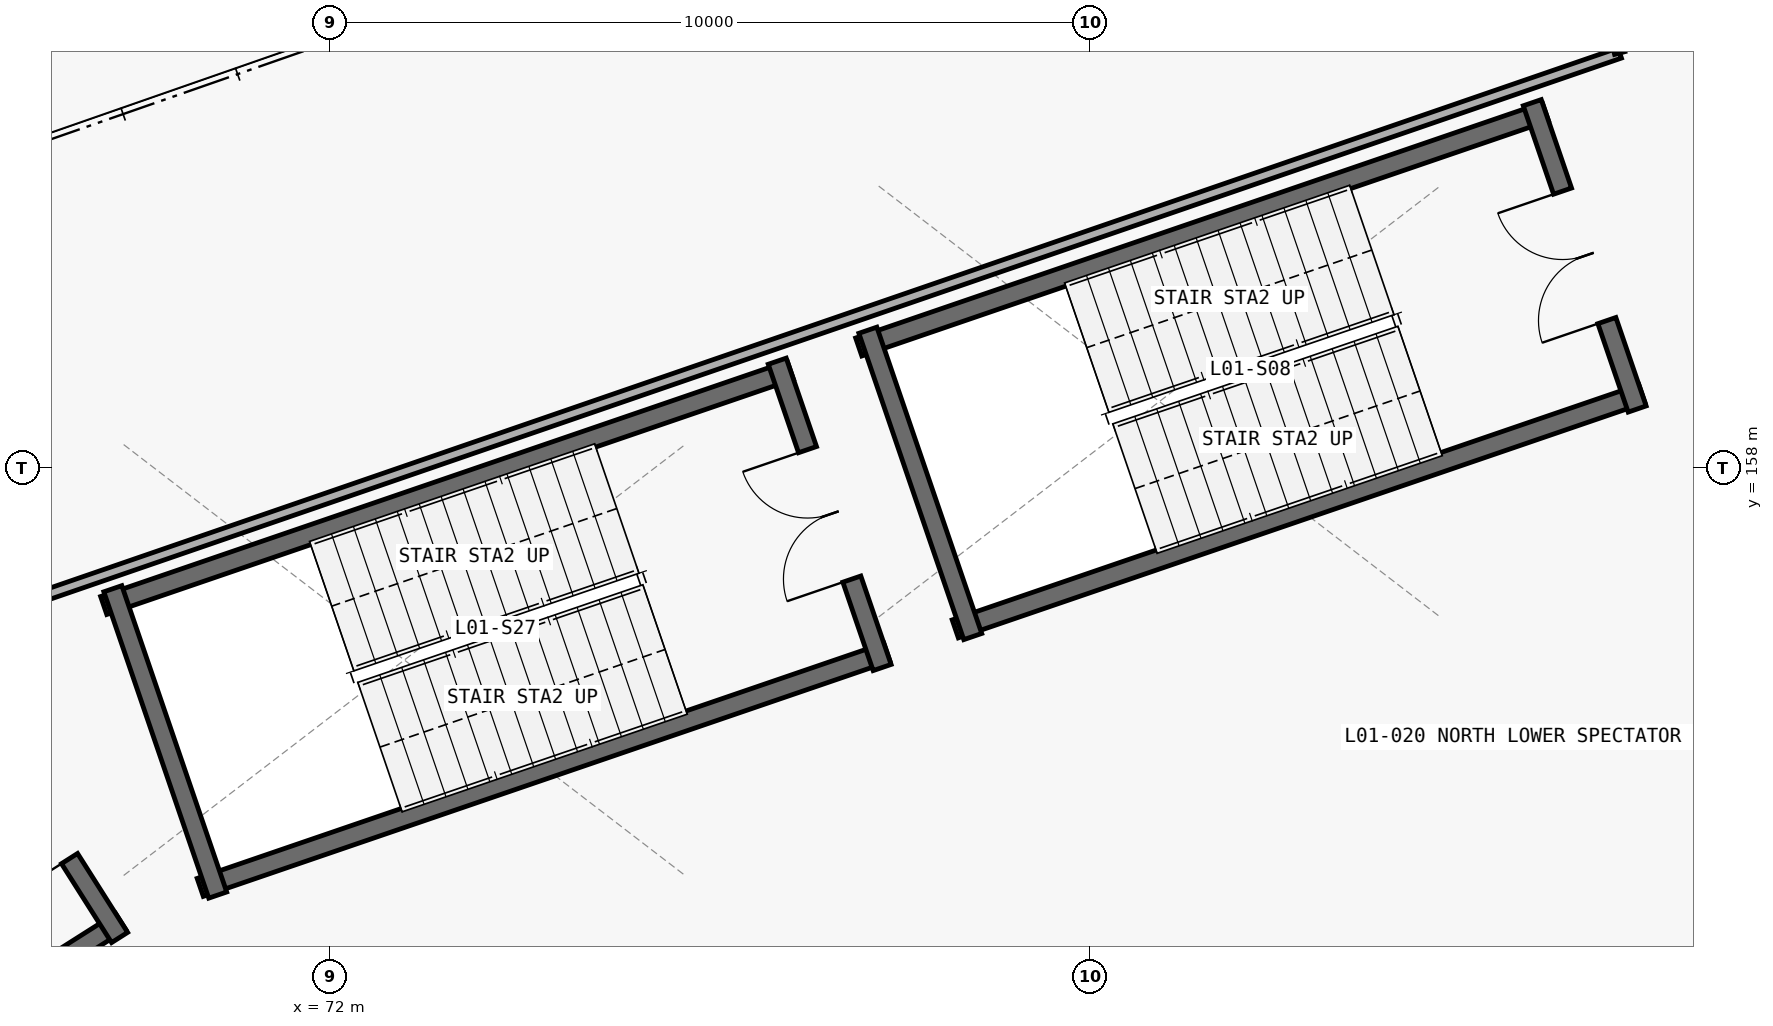
"""IFC4 building model, lengths in metres.
Left out: names, types, materials, properties, quantities, classifications, styles, units other than length and angle.
Written with IfcOpenShell. Run it as: python <this file> out.ifc"""

import sys

from ifc_helpers import new_model, si_unit, direction, frame, frame_2d, origin, place, context, subcontext, project, spatial, rectangle, extrude, element, fill, save


model = new_model("IFC4")
c1 = context("Model", 3, precision=1e-05, world=origin(), true_north=direction((0.0, 1.0)))
c2 = subcontext(c1, "Body", "Model", "MODEL_VIEW")
j1 = project(units=[si_unit("LENGTHUNIT", "METRE"), si_unit("PLANEANGLEUNIT", "RADIAN")], contexts=[c1])
p1 = place(None, origin())
s1 = spatial("IfcSite", under=j1, at=p1, CompositionType="ELEMENT")
p2 = place(p1, origin())
s2 = spatial("IfcBuilding", under=s1, at=p2, CompositionType="ELEMENT")
p3 = place(p2, frame((0.0, 0.0, 5.4)))
s3 = spatial("IfcBuildingStorey", under=s2, at=p3, CompositionType="ELEMENT", Elevation=5.4)
p4 = place(p3, frame((87.993, 162.686, 0.0), z_axis=(0.0, 0.0, 1.0), x_axis=(-0.946064424228, -0.323978556712, 0.0)))
e1 = element("IfcWall", 1, at=p4, inside=s3, PredefinedType="SHEAR", context=c2, shape_type="SweptSolid", body=[
    extrude(rectangle(XDim=9.55, YDim=0.25, at=frame_2d((4.775, 0.0))), origin(), (0.0, 0.0, 1.0), 4.52),
])
p5 = place(p3, frame((80.228, 155.883, 0.0), z_axis=(0.0, 0.0, 1.0), x_axis=(0.946067107432, 0.323970721263, 0.0)))
e2 = element("IfcWall", 2, at=p5, inside=s3, PredefinedType="SHEAR", context=c2, shape_type="SweptSolid", body=[
    extrude(rectangle(XDim=9.55, YDim=0.25, at=frame_2d((4.775, 0.0))), origin(), (0.0, 0.0, 1.0), 4.52),
])
p6 = place(p3, frame((89.199, 158.776, 0.0), z_axis=(0.0, 0.0, 1.0), x_axis=(-0.323988758717, 0.946060930504, 0.0)))
e3 = element("IfcWall", 3, at=p6, inside=s3, PredefinedType="SHEAR", context=c2, shape_type="SweptSolid", body=[
    extrude(rectangle(XDim=4.26, YDim=0.25, at=frame_2d((2.13, 0.0))), origin(), (0.0, 0.0, 1.0), 4.52),
])
p7 = place(p6, frame((1.23, 0.0, 0.0)))
e4 = element("IfcOpeningElement", 4, at=p7, cuts=e3, PredefinedType="OPENING", context=c2, shape_type="SweptSolid", body=[
    extrude(rectangle(XDim=1.8, YDim=2.25, at=frame_2d((0.9, 1.125))), frame((0.0, 0.135, 0.0), z_axis=(0.0, -1.0, 0.0), x_axis=(1.0, 0.0, 0.0)), (0.0, 0.0, 1.0), 0.27),
])
p8 = place(p3, frame((79.078, 159.812, 0.0), z_axis=(0.0, 0.0, 1.0), x_axis=(0.323971192516, -0.946066946056, 0.0)))
e5 = element("IfcWall", 5, at=p8, inside=s3, PredefinedType="SHEAR", context=c2, shape_type="SweptSolid", body=[
    extrude(rectangle(XDim=4.26, YDim=0.25, at=frame_2d((2.13, 0.0))), origin(), (0.0, 0.0, 1.0), 4.52),
])
p9 = place(p3, frame((61.183, 146.917, 0.0), z_axis=(0.0, 0.0, 1.0), x_axis=(0.844391246241, 0.535727004427, 0.0)))
e6 = element("IfcWall", 6, at=p9, inside=s3, PredefinedType="SHEAR", context=c2, shape_type="SweptSolid", body=[
    extrude(rectangle(XDim=9.55, YDim=0.25, at=frame_2d((4.775, 0.0))), origin(), (0.0, 0.0, 1.0), 4.52),
])
p10 = place(p3, frame((69.233, 151.823, 0.0), z_axis=(0.0, 0.0, 1.0), x_axis=(-0.535684577572, 0.844418162613, 0.0)))
e7 = element("IfcWall", 7, at=p10, inside=s3, PredefinedType="SHEAR", context=c2, shape_type="SweptSolid", body=[
    extrude(rectangle(XDim=4.26, YDim=0.25, at=frame_2d((2.13, 0.0))), origin(), (0.0, 0.0, 1.0), 4.52),
])
p11 = place(p10, frame((1.23, 0.0, 0.0)))
e8 = element("IfcOpeningElement", 8, at=p11, cuts=e7, PredefinedType="OPENING", context=c2, shape_type="SweptSolid", body=[
    extrude(rectangle(XDim=1.8, YDim=2.25, at=frame_2d((0.9, 1.125))), frame((0.0, 0.135, 0.0), z_axis=(0.0, -1.0, 0.0), x_axis=(1.0, 0.0, 0.0)), (0.0, 0.0, 1.0), 0.27),
])
for number, where, z_axis, x_axis in (
    (9, (78.059, 159.285, 0.0), (0.0, 0.0, 1.0), (-0.946, -0.324, 0.0)),
    (10, (70.294, 152.482, 0.0), (0.0, 0.0, 1.0), (0.946, 0.324, 0.0)),
):
    element("IfcWall", number, at=place(p3, frame(where, z_axis=z_axis, x_axis=x_axis)), inside=s3, PredefinedType="SHEAR", context=c2, shape_type="SweptSolid", body=[
        extrude(rectangle(XDim=9.55, YDim=0.25, at=frame_2d((4.775, 0.0))), origin(), (0.0, 0.0, 1.0), 4.52),
    ])
p12 = place(p3, frame((79.265, 155.375, 0.0), z_axis=(0.0, 0.0, 1.0), x_axis=(-0.323971192516, 0.946066946056, 0.0)))
e11 = element("IfcWall", 11, at=p12, inside=s3, PredefinedType="SHEAR", context=c2, shape_type="SweptSolid", body=[
    extrude(rectangle(XDim=4.26, YDim=0.25, at=frame_2d((2.13, 0.0))), origin(), (0.0, 0.0, 1.0), 4.52),
])
p13 = place(p12, frame((1.23, 0.0, 0.0)))
e12 = element("IfcOpeningElement", 12, at=p13, cuts=e11, PredefinedType="OPENING", context=c2, shape_type="SweptSolid", body=[
    extrude(rectangle(XDim=1.8, YDim=2.25, at=frame_2d((0.9, 1.125))), frame((0.0, 0.135, 0.0), z_axis=(0.0, -1.0, 0.0), x_axis=(1.0, 0.0, 0.0)), (0.0, 0.0, 1.0), 0.27),
])
p14 = place(p3, frame((69.144, 156.411, 0.0), z_axis=(0.0, 0.0, 1.0), x_axis=(0.323988758717, -0.946060930504, 0.0)))
e13 = element("IfcWall", 13, at=p14, inside=s3, PredefinedType="SHEAR", context=c2, shape_type="SweptSolid", body=[
    extrude(rectangle(XDim=4.26, YDim=0.25, at=frame_2d((2.13, 0.0))), origin(), (0.0, 0.0, 1.0), 4.52),
])
p15 = place(p3, frame((88.97, 163.459, 0.0), z_axis=(0.0, 0.0, 1.0), x_axis=(-0.945509956828, -0.32559318411, 0.0)))
e14 = element("IfcWall", 14, at=p15, inside=s3, PredefinedType="PARTITIONING", context=c2, shape_type="SweptSolid", body=[
    extrude(rectangle(XDim=22.697, YDim=0.14, at=frame_2d((11.348, 0.0))), origin(), (0.0, 0.0, 1.0), 3.665),
])
p16 = place(p3, frame((88.97, 163.459, 0.0), z_axis=(0.0, 0.0, 1.0), x_axis=(-0.258783945257, 0.965935230581, 0.0)))
e15 = element("IfcWall", 15, at=p16, inside=s3, PredefinedType="PARTITIONING", context=c2, shape_type="SweptSolid", body=[
    extrude(rectangle(XDim=0.935, YDim=0.14, at=frame_2d((0.467, 0.0))), origin(), (0.0, 0.0, 1.0), 3.665),
])
p17 = place(p7, origin())
e16 = element("IfcDoor", 16, at=p17, inside=s3, OperationType="DOUBLE_DOOR_SINGLE_SWING", PredefinedType="DOOR", context=c2, shape_type="SweptSolid", body=[
    extrude(rectangle(XDim=1.8, YDim=2.25, at=frame_2d((0.9, 1.125))), frame((0.0, 0.025, 0.0), z_axis=(0.0, -1.0, 0.0), x_axis=(1.0, 0.0, 0.0)), (0.0, 0.0, 1.0), 0.05),
])
fill(e4, e16)
p18 = place(p11, origin())
e17 = element("IfcDoor", 17, at=p18, inside=s3, OperationType="DOUBLE_DOOR_SINGLE_SWING", PredefinedType="DOOR", context=c2, shape_type="SweptSolid", body=[
    extrude(rectangle(XDim=1.8, YDim=2.25, at=frame_2d((0.9, 1.125))), frame((0.0, 0.025, 0.0), z_axis=(0.0, -1.0, 0.0), x_axis=(1.0, 0.0, 0.0)), (0.0, 0.0, 1.0), 0.05),
])
fill(e8, e17)
p19 = place(p13, origin())
e18 = element("IfcDoor", 18, at=p19, inside=s3, OperationType="DOUBLE_DOOR_SINGLE_SWING", PredefinedType="DOOR", context=c2, shape_type="SweptSolid", body=[
    extrude(rectangle(XDim=1.8, YDim=2.25, at=frame_2d((0.9, 1.125))), frame((0.0, 0.025, 0.0), z_axis=(0.0, -1.0, 0.0), x_axis=(1.0, 0.0, 0.0)), (0.0, 0.0, 1.0), 0.05),
])
fill(e12, e18)
save(model, sys.argv[1])
